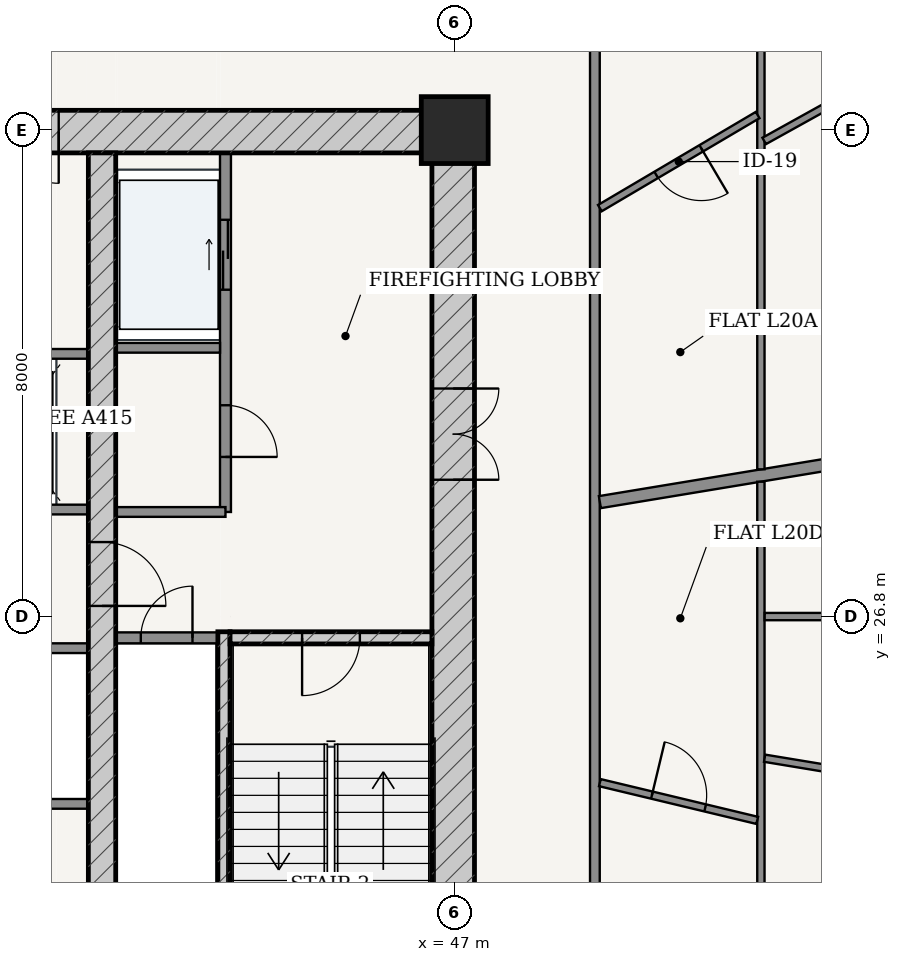
"""IFC4 building model, lengths in metres.
Left out: names, types, materials, properties, quantities, classifications, styles, units other than length and angle.
Written with IfcOpenShell. Run it as: python <this file> out.ifc"""

import sys

from ifc_helpers import new_model, si_unit, direction, frame, frame_2d, origin, origin_2d, place, context, subcontext, project, spatial, rectangle, extrude, source, transform, mapped, element, fill, save


model = new_model("IFC4")
c1 = context("Model", 3, precision=1e-05, world=origin(), true_north=direction((-0.2419218956, 0.970295726276)))
c2 = subcontext(c1, "Body", "Model", "MODEL_VIEW")
j1 = project(units=[si_unit("LENGTHUNIT", "METRE"), si_unit("PLANEANGLEUNIT", "RADIAN")], contexts=[c1])
p1 = place(None, origin())
s1 = spatial("IfcSite", under=j1, at=p1, CompositionType="ELEMENT")
p2 = place(p1, origin())
s2 = spatial("IfcBuilding", under=s1, at=p2, CompositionType="ELEMENT")
p3 = place(p2, frame((0.0, 0.0, 79.8)))
s3 = spatial("IfcBuildingStorey", under=s2, at=p3, CompositionType="ELEMENT", Elevation=79.8)
p4 = place(p3, frame((47.0, 34.8, 0.0), z_axis=(0.0, 0.0, 1.0), x_axis=(1.0, 0.0, 0.0)))
e1 = element("IfcColumn", 1, at=p4, inside=s3, PredefinedType="COLUMN", context=c2, shape_type="SweptSolid", body=[
    extrude(rectangle(XDim=1.1, YDim=1.1, at=origin_2d()), origin(), (0.0, 0.0, 1.0), 3.6),
])
p5 = place(p3, frame((28.675, 34.775, 0.0), z_axis=(0.0, 0.0, 1.0), x_axis=(1.0, 0.0, 0.0)))
e2 = element("IfcWall", 2, at=p5, inside=s3, PredefinedType="SHEAR", context=c2, shape_type="SweptSolid", body=[
    extrude(rectangle(XDim=18.65, YDim=0.7, at=frame_2d((9.325, 0.0))), origin(), (0.0, 0.0, 1.0), 3.325),
])
p6 = place(p5, frame((6.837, 0.0, 0.0)))
e3 = element("IfcOpeningElement", 3, at=p6, cuts=e2, PredefinedType="OPENING", context=c2, shape_type="SweptSolid", body=[
    extrude(rectangle(XDim=0.85, YDim=2.1, at=frame_2d((0.425, 1.05))), frame((0.0, 0.36, 0.0), z_axis=(0.0, -1.0, 0.0), x_axis=(1.0, 0.0, 0.0)), (0.0, 0.0, 1.0), 0.72),
])
p7 = place(p5, frame((8.895, 0.0, 0.0)))
e4 = element("IfcOpeningElement", 4, at=p7, cuts=e2, PredefinedType="OPENING", context=c2, shape_type="SweptSolid", body=[
    extrude(rectangle(XDim=0.86, YDim=2.1, at=frame_2d((0.43, 1.05))), frame((0.0, 0.36, 0.0), z_axis=(0.0, -1.0, 0.0), x_axis=(1.0, 0.0, 0.0)), (0.0, 0.0, 1.0), 0.72),
])
p8 = place(p5, frame((10.962, 0.0, 0.0)))
e5 = element("IfcOpeningElement", 5, at=p8, cuts=e2, PredefinedType="OPENING", context=c2, shape_type="SweptSolid", body=[
    extrude(rectangle(XDim=0.85, YDim=2.1, at=frame_2d((0.425, 1.05))), frame((0.0, 0.36, 0.0), z_axis=(0.0, -1.0, 0.0), x_axis=(1.0, 0.0, 0.0)), (0.0, 0.0, 1.0), 0.72),
])
p9 = place(p3, frame((46.975, 19.175, 0.0), z_axis=(0.0, 0.0, 1.0), x_axis=(0.0, 1.0, 0.0)))
e6 = element("IfcWall", 6, at=p9, inside=s3, PredefinedType="SHEAR", context=c2, shape_type="SweptSolid", body=[
    extrude(rectangle(XDim=15.25, YDim=0.7, at=frame_2d((7.625, 0.0))), origin(), (0.0, 0.0, 1.0), 3.325),
])
p10 = place(p9, frame((9.875, 0.0, 0.0)))
e7 = element("IfcOpeningElement", 7, at=p10, cuts=e6, PredefinedType="OPENING", context=c2, shape_type="SweptSolid", body=[
    extrude(rectangle(XDim=1.5, YDim=2.2, at=frame_2d((0.75, 1.1))), frame((0.0, 0.36, 0.0), z_axis=(0.0, -1.0, 0.0), x_axis=(1.0, 0.0, 0.0)), (0.0, 0.0, 1.0), 0.72),
])
p11 = place(p3, frame((43.205, 19.175, 0.0), z_axis=(0.0, 0.0, 1.0), x_axis=(0.0, 1.0, 0.0)))
e8 = element("IfcWall", 8, at=p11, inside=s3, PredefinedType="SOLIDWALL", context=c2, shape_type="SweptSolid", body=[
    extrude(rectangle(XDim=7.375, YDim=0.2, at=frame_2d((3.688, 0.0))), origin(), (0.0, 0.0, 1.0), 3.325),
])
p12 = place(p3, frame((43.305, 26.45, 0.0), z_axis=(0.0, 0.0, 1.0), x_axis=(1.0, 0.0, 0.0)))
e9 = element("IfcWall", 9, at=p12, inside=s3, PredefinedType="SOLIDWALL", context=c2, shape_type="SweptSolid", body=[
    extrude(rectangle(XDim=3.32, YDim=0.2, at=frame_2d((1.66, 0.0))), origin(), (0.0, 0.0, 1.0), 3.325),
])
p13 = place(p12, frame((1.185, 0.0, 0.0)))
e10 = element("IfcOpeningElement", 10, at=p13, cuts=e9, PredefinedType="OPENING", context=c2, shape_type="SweptSolid", body=[
    extrude(rectangle(XDim=0.95, YDim=2.15, at=frame_2d((0.475, 1.075))), frame((0.0, 0.11, 0.0), z_axis=(0.0, -1.0, 0.0), x_axis=(1.0, 0.0, 0.0)), (0.0, 0.0, 1.0), 0.22),
])
p14 = place(p3, frame((41.2, 19.175, 0.0), z_axis=(0.0, 0.0, 1.0), x_axis=(0.0, 1.0, 0.0)))
e11 = element("IfcWall", 11, at=p14, inside=s3, PredefinedType="SHEAR", context=c2, shape_type="SweptSolid", body=[
    extrude(rectangle(XDim=15.25, YDim=0.45, at=frame_2d((7.625, 0.0))), origin(), (0.0, 0.0, 1.0), 3.325),
])
p15 = place(p14, frame((7.8, 0.0, 0.0)))
e12 = element("IfcOpeningElement", 12, at=p15, cuts=e11, PredefinedType="OPENING", context=c2, shape_type="SweptSolid", body=[
    extrude(rectangle(XDim=1.05, YDim=2.15, at=frame_2d((0.525, 1.075))), frame((0.0, 0.235, 0.0), z_axis=(0.0, -1.0, 0.0), x_axis=(1.0, 0.0, 0.0)), (0.0, 0.0, 1.0), 0.47),
])
p16 = place(p3, frame((41.425, 26.45, 0.0), z_axis=(0.0, 0.0, 1.0), x_axis=(1.0, 0.0, 0.0)))
e13 = element("IfcWall", 13, at=p16, inside=s3, PredefinedType="PARTITIONING", context=c2, shape_type="SweptSolid", body=[
    extrude(rectangle(XDim=1.675, YDim=0.18, at=frame_2d((0.837, 0.0))), origin(), (0.0, 0.0, 1.0), 3.325),
])
p17 = place(p16, frame((0.413, 0.0, 0.0)))
e14 = element("IfcOpeningElement", 14, at=p17, cuts=e13, PredefinedType="OPENING", context=c2, shape_type="SweptSolid", body=[
    extrude(rectangle(XDim=0.85, YDim=2.1, at=frame_2d((0.425, 1.05))), frame((0.0, 0.1, 0.0), z_axis=(0.0, -1.0, 0.0), x_axis=(1.0, 0.0, 0.0)), (0.0, 0.0, 1.0), 0.2),
])
p18 = place(p3, frame((43.23, 28.52, 0.0), z_axis=(0.0, 0.0, 1.0), x_axis=(0.0, 1.0, 0.0)))
e15 = element("IfcWall", 15, at=p18, inside=s3, PredefinedType="PARTITIONING", context=c2, shape_type="SweptSolid", body=[
    extrude(rectangle(XDim=5.905, YDim=0.18, at=frame_2d((2.953, 0.0))), origin(), (0.0, 0.0, 1.0), 3.325),
])
p19 = place(p18, frame((0.905, 0.0, 0.0)))
e16 = element("IfcOpeningElement", 16, at=p19, cuts=e15, PredefinedType="OPENING", context=c2, shape_type="SweptSolid", body=[
    extrude(rectangle(XDim=0.85, YDim=2.1, at=frame_2d((0.425, 1.05))), frame((0.0, 0.1, 0.0), z_axis=(0.0, -1.0, 0.0), x_axis=(1.0, 0.0, 0.0)), (0.0, 0.0, 1.0), 0.2),
])
p20 = place(p18, frame((3.655, 0.0, 0.0)))
e17 = element("IfcOpeningElement", 17, at=p20, cuts=e15, PredefinedType="OPENING", context=c2, shape_type="SweptSolid", body=[
    extrude(rectangle(XDim=1.15, YDim=2.2, at=frame_2d((0.575, 1.1))), frame((0.0, 0.1, 0.0), z_axis=(0.0, -1.0, 0.0), x_axis=(1.0, 0.0, 0.0)), (0.0, 0.0, 1.0), 0.2),
])
p21 = place(p3, frame((41.425, 31.22, 0.0), z_axis=(0.0, 0.0, 1.0), x_axis=(1.0, 0.0, 0.0)))
e18 = element("IfcWall", 18, at=p21, inside=s3, PredefinedType="PARTITIONING", context=c2, shape_type="SweptSolid", body=[
    extrude(rectangle(XDim=1.715, YDim=0.16, at=frame_2d((0.857, 0.0))), origin(), (0.0, 0.0, 1.0), 3.325),
])
p22 = place(p3, frame((41.425, 28.52, 0.0), z_axis=(0.0, 0.0, 1.0), x_axis=(1.0, 0.0, 0.0)))
e19 = element("IfcWall", 19, at=p22, inside=s3, PredefinedType="PARTITIONING", context=c2, shape_type="SweptSolid", body=[
    extrude(rectangle(XDim=1.805, YDim=0.16, at=frame_2d((0.902, 0.0))), origin(), (0.0, 0.0, 1.0), 3.325),
])
p23 = place(p3, frame((35.025, 28.56, 0.0), z_axis=(0.0, 0.0, 1.0), x_axis=(1.0, 0.0, 0.0)))
e20 = element("IfcWall", 20, at=p23, inside=s3, PredefinedType="PARTITIONING", context=c2, shape_type="SweptSolid", body=[
    extrude(rectangle(XDim=5.95, YDim=0.16, at=frame_2d((2.975, 0.0))), origin(), (0.0, 0.0, 1.0), 3.325),
])
p24 = place(p23, frame((0.76, 0.0, 0.0)))
e21 = element("IfcOpeningElement", 21, at=p24, cuts=e20, PredefinedType="OPENING", context=c2, shape_type="SweptSolid", body=[
    extrude(rectangle(XDim=1.1, YDim=2.2, at=frame_2d((0.55, 1.1))), frame((0.0, 0.09, 0.0), z_axis=(0.0, -1.0, 0.0), x_axis=(1.0, 0.0, 0.0)), (0.0, 0.0, 1.0), 0.18),
])
p25 = place(p23, frame((2.425, 0.0, 0.0)))
e22 = element("IfcOpeningElement", 22, at=p25, cuts=e20, PredefinedType="OPENING", context=c2, shape_type="SweptSolid", body=[
    extrude(rectangle(XDim=1.1, YDim=2.2, at=frame_2d((0.55, 1.1))), frame((0.0, 0.09, 0.0), z_axis=(0.0, -1.0, 0.0), x_axis=(1.0, 0.0, 0.0)), (0.0, 0.0, 1.0), 0.18),
])
p26 = place(p23, frame((4.09, 0.0, 0.0)))
e23 = element("IfcOpeningElement", 23, at=p26, cuts=e20, PredefinedType="OPENING", context=c2, shape_type="SweptSolid", body=[
    extrude(rectangle(XDim=1.1, YDim=2.2, at=frame_2d((0.55, 1.1))), frame((0.0, 0.09, 0.0), z_axis=(0.0, -1.0, 0.0), x_axis=(1.0, 0.0, 0.0)), (0.0, 0.0, 1.0), 0.18),
])
for number, where, z_axis, x_axis in (
    (24, (35.025, 31.12, 0.0), (0.0, 0.0, 1.0), (1.0, 0.0, 0.0)),
    (25, (35.025, 26.28, 0.0), (0.0, 0.0, 1.0), (1.0, 0.0, 0.0)),
    (26, (35.025, 23.72, 0.0), (0.0, 0.0, 1.0), (1.0, 0.0, 0.0)),
):
    element("IfcWall", number, at=place(p3, frame(where, z_axis=z_axis, x_axis=x_axis)), inside=s3, PredefinedType="PARTITIONING", context=c2, shape_type="SweptSolid", body=[
        extrude(rectangle(XDim=5.95, YDim=0.16, at=frame_2d((2.975, 0.0))), origin(), (0.0, 0.0, 1.0), 3.325),
    ])
p27 = place(p3, frame((49.305, 16.575, 0.0), z_axis=(0.0, 0.0, 1.0), x_axis=(0.0, 1.0, 0.0)))
e27 = element("IfcWall", 27, at=p27, inside=s3, PredefinedType="PARTITIONING", context=c2, shape_type="SweptSolid", body=[
    extrude(rectangle(XDim=20.45, YDim=0.16, at=frame_2d((10.225, 0.0))), origin(), (0.0, 0.0, 1.0), 2.767),
])
p28 = place(p27, frame((1.649, 0.0, 0.0)))
e28 = element("IfcOpeningElement", 28, at=p28, cuts=e27, PredefinedType="OPENING", context=c2, shape_type="SweptSolid", body=[
    extrude(rectangle(XDim=0.98, YDim=2.2, at=frame_2d((0.49, 1.1))), frame((0.0, 0.09, 0.0), z_axis=(0.0, -1.0, 0.0), x_axis=(1.0, 0.0, 0.0)), (0.0, 0.0, 1.0), 0.18),
])
p29 = place(p3, frame((49.387, 28.682, 0.0), z_axis=(0.0, 0.0, 1.0), x_axis=(0.986617934215, 0.163049231479, 0.0)))
e29 = element("IfcWall", 29, at=p29, inside=s3, PredefinedType="PARTITIONING", context=c2, shape_type="SweptSolid", body=[
    extrude(rectangle(XDim=14.785, YDim=0.2, at=frame_2d((7.392, 0.0))), origin(), (0.0, 0.0, 1.0), 2.767),
])
p30 = place(p3, frame((52.035, 39.835, 0.0), z_axis=(0.0, 0.0, 1.0), x_axis=(0.0, -1.0, 0.0)))
e30 = element("IfcWall", 30, at=p30, inside=s3, PredefinedType="PARTITIONING", context=c2, shape_type="SweptSolid", body=[
    extrude(rectangle(XDim=10.614, YDim=0.12, at=frame_2d((5.307, 0.0))), origin(), (0.0, 0.0, 1.0), 2.767),
])
p31 = place(p30, frame((2.107, 0.0, 0.0)))
e31 = element("IfcOpeningElement", 31, at=p31, cuts=e30, PredefinedType="OPENING", context=c2, shape_type="SweptSolid", body=[
    extrude(rectangle(XDim=0.9, YDim=2.15, at=frame_2d((0.45, 1.075))), frame((0.0, 0.07, 0.0), z_axis=(0.0, -1.0, 0.0), x_axis=(1.0, 0.0, 0.0)), (0.0, 0.0, 1.0), 0.14),
])
p32 = place(p3, frame((52.089, 34.622, 0.0), z_axis=(0.0, 0.0, 1.0), x_axis=(0.874324904351, 0.485341077626, 0.0)))
e32 = element("IfcWall", 32, at=p32, inside=s3, PredefinedType="PARTITIONING", context=c2, shape_type="SweptSolid", body=[
    extrude(rectangle(XDim=9.066, YDim=0.12, at=frame_2d((4.533, 0.0))), origin(), (0.0, 0.0, 1.0), 2.767),
])
p33 = place(p32, frame((3.016, 0.0, 0.0)))
e33 = element("IfcOpeningElement", 33, at=p33, cuts=e32, PredefinedType="OPENING", context=c2, shape_type="SweptSolid", body=[
    extrude(rectangle(XDim=0.9, YDim=2.15, at=frame_2d((0.45, 1.075))), frame((0.0, 0.07, 0.0), z_axis=(0.0, -1.0, 0.0), x_axis=(1.0, 0.0, 0.0)), (0.0, 0.0, 1.0), 0.14),
])
p34 = place(p3, frame((49.387, 33.517, 0.0), z_axis=(0.0, 0.0, 1.0), x_axis=(0.861344081849, 0.508022019862, 0.0)))
e34 = element("IfcWall", 34, at=p34, inside=s3, PredefinedType="PARTITIONING", context=c2, shape_type="SweptSolid", body=[
    extrude(rectangle(XDim=3.013, YDim=0.12, at=frame_2d((1.506, 0.0))), origin(), (0.0, 0.0, 1.0), 3.325),
])
p35 = place(p34, frame((1.076, 0.0, 0.0)))
e35 = element("IfcOpeningElement", 35, at=p35, cuts=e34, PredefinedType="OPENING", context=c2, shape_type="SweptSolid", body=[
    extrude(rectangle(XDim=0.86, YDim=2.15, at=frame_2d((0.43, 1.075))), frame((0.0, 0.07, 0.0), z_axis=(0.0, -1.0, 0.0), x_axis=(1.0, 0.0, 0.0)), (0.0, 0.0, 1.0), 0.14),
])
p36 = place(p3, frame((52.035, 29.017, 0.0), z_axis=(0.0, 0.0, 1.0), x_axis=(0.0, -1.0, 0.0)))
e36 = element("IfcWall", 36, at=p36, inside=s3, PredefinedType="PARTITIONING", context=c2, shape_type="SweptSolid", body=[
    extrude(rectangle(XDim=15.252, YDim=0.12, at=frame_2d((7.626, 0.0))), origin(), (0.0, 0.0, 1.0), 2.767),
])
p37 = place(p36, frame((7.278, 0.0, 0.0)))
e37 = element("IfcOpeningElement", 37, at=p37, cuts=e36, PredefinedType="OPENING", context=c2, shape_type="SweptSolid", body=[
    extrude(rectangle(XDim=0.9, YDim=2.15, at=frame_2d((0.45, 1.075))), frame((0.0, 0.07, 0.0), z_axis=(0.0, -1.0, 0.0), x_axis=(1.0, 0.0, 0.0)), (0.0, 0.0, 1.0), 0.14),
])
p38 = place(p3, frame((52.096, 24.47, 0.0), z_axis=(0.0, 0.0, 1.0), x_axis=(0.986618264768, -0.163047231274, 0.0)))
e38 = element("IfcWall", 38, at=p38, inside=s3, PredefinedType="PARTITIONING", context=c2, shape_type="SweptSolid", body=[
    extrude(rectangle(XDim=12.039, YDim=0.12, at=frame_2d((6.02, 0.0))), origin(), (0.0, 0.0, 1.0), 2.767),
])
p39 = place(p38, frame((4.496, 0.0, 0.0)))
e39 = element("IfcOpeningElement", 39, at=p39, cuts=e38, PredefinedType="OPENING", context=c2, shape_type="SweptSolid", body=[
    extrude(rectangle(XDim=0.9, YDim=2.15, at=frame_2d((0.45, 1.075))), frame((0.0, 0.07, 0.0), z_axis=(0.0, -1.0, 0.0), x_axis=(1.0, 0.0, 0.0)), (0.0, 0.0, 1.0), 0.14),
])
p40 = place(p3, frame((52.097, 26.8, 0.0), z_axis=(0.0, 0.0, 1.0), x_axis=(1.0, 0.0, 0.0)))
e40 = element("IfcWall", 40, at=p40, inside=s3, PredefinedType="PARTITIONING", context=c2, shape_type="SweptSolid", body=[
    extrude(rectangle(XDim=12.443, YDim=0.12, at=frame_2d((6.222, 0.0))), origin(), (0.0, 0.0, 1.0), 2.767),
])
p41 = place(p40, frame((5.771, 0.0, 0.0)))
e41 = element("IfcOpeningElement", 41, at=p41, cuts=e40, PredefinedType="OPENING", context=c2, shape_type="SweptSolid", body=[
    extrude(rectangle(XDim=0.9, YDim=2.15, at=frame_2d((0.45, 1.075))), frame((0.0, 0.07, 0.0), z_axis=(0.0, -1.0, 0.0), x_axis=(1.0, 0.0, 0.0)), (0.0, 0.0, 1.0), 0.14),
])
p42 = place(p3, frame((49.387, 24.069, 0.0), z_axis=(0.0, 0.0, 1.0), x_axis=(0.972423933179, -0.233220269661, 0.0)))
e42 = element("IfcWall", 42, at=p42, inside=s3, PredefinedType="PARTITIONING", context=c2, shape_type="SweptSolid", body=[
    extrude(rectangle(XDim=2.661, YDim=0.12, at=frame_2d((1.331, 0.0))), origin(), (0.0, 0.0, 1.0), 3.325),
])
p43 = place(p42, frame((0.881, 0.0, 0.0)))
e43 = element("IfcOpeningElement", 43, at=p43, cuts=e42, PredefinedType="OPENING", context=c2, shape_type="SweptSolid", body=[
    extrude(rectangle(XDim=0.9, YDim=2.15, at=frame_2d((0.45, 1.075))), frame((0.0, 0.07, 0.0), z_axis=(0.0, -1.0, 0.0), x_axis=(1.0, 0.0, 0.0)), (0.0, 0.0, 1.0), 0.14),
])
m1 = source(origin(), c2, "Body", "SweptSolid", [
    extrude(rectangle(XDim=1.5, YDim=2.2, at=frame_2d((0.75, 1.1))), frame((0.0, 0.025, 0.0), z_axis=(0.0, -1.0, 0.0), x_axis=(1.0, 0.0, 0.0)), (0.0, 0.0, 1.0), 0.05),
])
p44 = place(p10, frame((1.5, 0.0, 0.0), z_axis=(0.0, 0.0, 1.0), x_axis=(-1.0, 0.0, 0.0)))
e44 = element("IfcDoor", 44, at=p44, inside=s3, OperationType="DOUBLE_DOOR_SINGLE_SWING", PredefinedType="DOOR", context=c2, shape_type="MappedRepresentation", body=[
    mapped(m1, transform((0.0, 0.0, 0.0), scale=1.0)),
])
fill(e7, e44)
m2 = source(origin(), c2, "Body", "SweptSolid", [
    extrude(rectangle(XDim=1.05, YDim=2.15, at=frame_2d((0.525, 1.075))), frame((0.0, 0.025, 0.0), z_axis=(0.0, -1.0, 0.0), x_axis=(1.0, 0.0, 0.0)), (0.0, 0.0, 1.0), 0.05),
])
p45 = place(p15, frame((1.05, 0.0, 0.0), z_axis=(0.0, 0.0, 1.0), x_axis=(-1.0, 0.0, 0.0)))
e45 = element("IfcDoor", 45, at=p45, inside=s3, OperationType="SINGLE_SWING_RIGHT", PredefinedType="DOOR", context=c2, shape_type="MappedRepresentation", body=[
    mapped(m2, transform((0.0, 0.0, 0.0), scale=1.0)),
])
fill(e12, e45)
m3 = source(origin(), c2, "Body", "SweptSolid", [
    extrude(rectangle(XDim=0.95, YDim=2.15, at=frame_2d((0.475, 1.075))), frame((0.0, 0.025, 0.0), z_axis=(0.0, -1.0, 0.0), x_axis=(1.0, 0.0, 0.0)), (0.0, 0.0, 1.0), 0.05),
])
p46 = place(p13, frame((0.95, 0.0, 0.0), z_axis=(0.0, 0.0, 1.0), x_axis=(-1.0, 0.0, 0.0)))
e46 = element("IfcDoor", 46, at=p46, inside=s3, OperationType="SINGLE_SWING_RIGHT", PredefinedType="DOOR", context=c2, shape_type="MappedRepresentation", body=[
    mapped(m3, transform((0.0, 0.0, 0.0), scale=1.0)),
])
fill(e10, e46)
m4 = source(origin(), c2, "Body", "SweptSolid", [
    extrude(rectangle(XDim=0.85, YDim=2.1, at=frame_2d((0.425, 1.05))), frame((0.0, 0.025, 0.0), z_axis=(0.0, -1.0, 0.0), x_axis=(1.0, 0.0, 0.0)), (0.0, 0.0, 1.0), 0.05),
])
p47 = place(p17, origin())
e47 = element("IfcDoor", 47, at=p47, inside=s3, OperationType="SINGLE_SWING_RIGHT", PredefinedType="DOOR", context=c2, shape_type="MappedRepresentation", body=[
    mapped(m4, transform((0.0, 0.0, 0.0), scale=1.0)),
])
fill(e14, e47)
p48 = place(p19, frame((0.85, 0.0, 0.0), z_axis=(0.0, 0.0, 1.0), x_axis=(-1.0, 0.0, 0.0)))
e48 = element("IfcDoor", 48, at=p48, inside=s3, OperationType="SINGLE_SWING_RIGHT", PredefinedType="DOOR", context=c2, shape_type="MappedRepresentation", body=[
    mapped(m4, transform((0.0, 0.0, 0.0), scale=1.0)),
])
fill(e16, e48)
p49 = place(p8, frame((0.85, 0.0, 0.0), z_axis=(0.0, 0.0, 1.0), x_axis=(-1.0, 0.0, 0.0)))
e49 = element("IfcDoor", 49, at=p49, inside=s3, OperationType="SINGLE_SWING_LEFT", PredefinedType="DOOR", context=c2, shape_type="MappedRepresentation", body=[
    mapped(m4, transform((0.0, 0.0, 0.0), scale=1.0)),
])
fill(e5, e49)
m5 = source(origin(), c2, "Body", "SweptSolid", [
    extrude(rectangle(XDim=1.15, YDim=2.2, at=frame_2d((0.575, 1.1))), frame((0.0, 0.025, 0.0), z_axis=(0.0, -1.0, 0.0), x_axis=(1.0, 0.0, 0.0)), (0.0, 0.0, 1.0), 0.05),
])
p50 = place(p20, origin())
e50 = element("IfcDoor", 50, at=p50, inside=s3, OperationType="DOUBLE_DOOR_SLIDING", PredefinedType="DOOR", context=c2, shape_type="MappedRepresentation", body=[
    mapped(m5, transform((0.0, 0.0, 0.0), scale=1.0)),
])
fill(e17, e50)
m6 = source(origin(), c2, "Body", "SweptSolid", [
    extrude(rectangle(XDim=0.86, YDim=2.15, at=frame_2d((0.43, 1.075))), frame((0.0, 0.025, 0.0), z_axis=(0.0, -1.0, 0.0), x_axis=(1.0, 0.0, 0.0)), (0.0, 0.0, 1.0), 0.05),
])
p51 = place(p35, frame((0.86, 0.0, 0.0), z_axis=(0.0, 0.0, 1.0), x_axis=(-1.0, 0.0, 0.0)))
e51 = element("IfcDoor", 51, at=p51, inside=s3, OperationType="SINGLE_SWING_LEFT", PredefinedType="DOOR", context=c2, shape_type="MappedRepresentation", body=[
    mapped(m6, transform((0.0, 0.0, 0.0), scale=1.0)),
])
fill(e35, e51)
m7 = source(origin(), c2, "Body", "SweptSolid", [
    extrude(rectangle(XDim=0.9, YDim=2.15, at=frame_2d((0.45, 1.075))), frame((0.0, 0.025, 0.0), z_axis=(0.0, -1.0, 0.0), x_axis=(1.0, 0.0, 0.0)), (0.0, 0.0, 1.0), 0.05),
])
p52 = place(p43, origin())
e52 = element("IfcDoor", 52, at=p52, inside=s3, OperationType="SINGLE_SWING_LEFT", PredefinedType="DOOR", context=c2, shape_type="MappedRepresentation", body=[
    mapped(m7, transform((0.0, 0.0, 0.0), scale=1.0)),
])
fill(e43, e52)
save(model, sys.argv[1])
